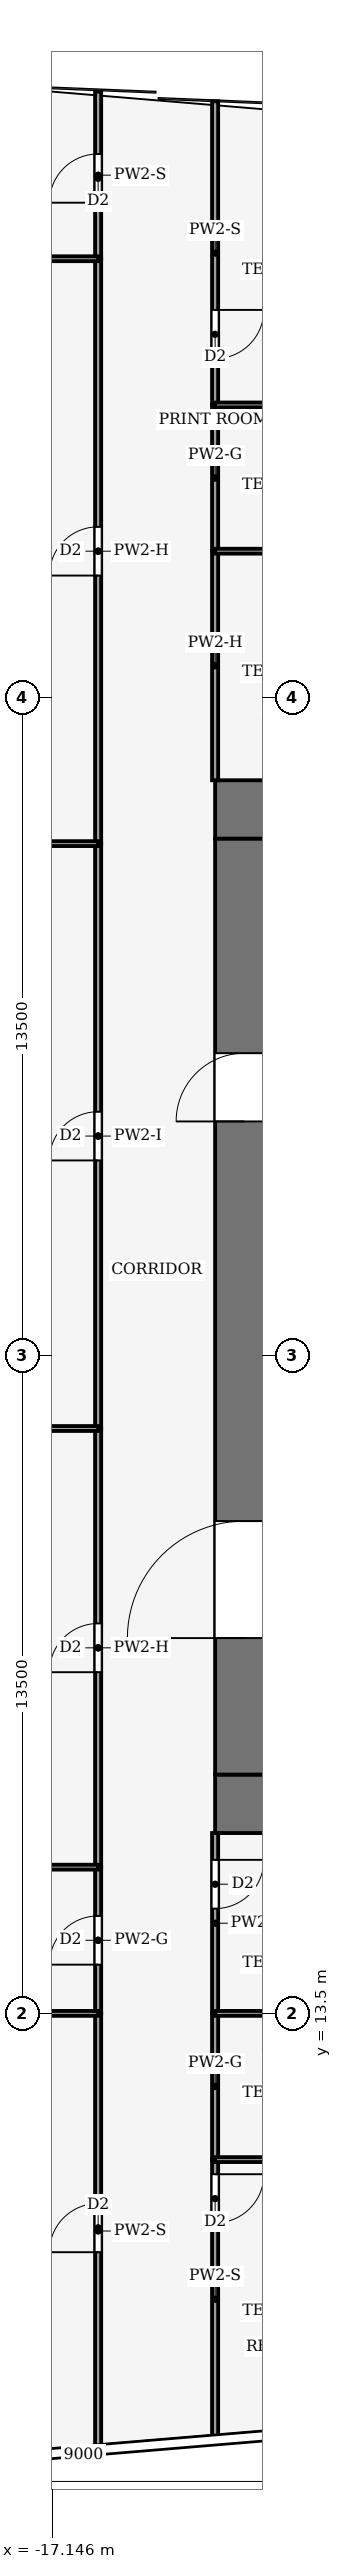
"""IFC4 building model, lengths in metres.
Left out: names, types, materials, properties, quantities, classifications, styles, units other than length and angle.
Written with IfcOpenShell. Run it as: python <this file> out.ifc"""

import sys

from ifc_helpers import new_model, si_unit, direction, frame, frame_2d, origin, place, context, subcontext, project, spatial, rectangle, extrude, element, fill, save


model = new_model("IFC4")
c1 = context("Model", 3, precision=1e-05, world=origin(), true_north=direction((0.0, 1.0)))
c2 = subcontext(c1, "Body", "Model", "MODEL_VIEW")
j1 = project(units=[si_unit("LENGTHUNIT", "METRE"), si_unit("PLANEANGLEUNIT", "RADIAN")], contexts=[c1])
p1 = place(None, origin())
s1 = spatial("IfcSite", under=j1, at=p1, CompositionType="ELEMENT")
p2 = place(p1, origin())
s2 = spatial("IfcBuilding", under=s1, at=p2, CompositionType="ELEMENT")
p3 = place(p2, frame((0.0, 0.0, 90.0)))
s3 = spatial("IfcBuildingStorey", under=s2, at=p3, CompositionType="ELEMENT", Elevation=90.0)
for number, where, z_axis, x_axis in (
    (1, (-13.8, 17.8, -0.13), (0.0, 0.0, 1.0), (1.0, 0.0, 0.0)),
    (2, (-13.8, 38.2, -0.13), (0.0, 0.0, 1.0), (1.0, 0.0, 0.0)),
):
    element("IfcWall", number, at=place(p3, frame(where, z_axis=z_axis, x_axis=x_axis)), inside=s3, PredefinedType="SHEAR", context=c2, shape_type="SweptSolid", body=[
        extrude(rectangle(XDim=27.6, YDim=1.2, at=frame_2d((13.8, 0.0))), origin(), (0.0, 0.0, 1.0), 4.0),
    ])
p4 = place(p3, frame((-13.2, 18.4, -0.13), z_axis=(0.0, 0.0, 1.0), x_axis=(0.0, 1.0, 0.0)))
e3 = element("IfcWall", 3, at=p4, inside=s3, PredefinedType="SHEAR", context=c2, shape_type="SweptSolid", body=[
    extrude(rectangle(XDim=19.2, YDim=1.2, at=frame_2d((9.6, 0.0))), origin(), (0.0, 0.0, 1.0), 4.0),
])
p5 = place(p4, frame((2.8, 0.0, 0.13)))
e4 = element("IfcOpeningElement", 4, at=p5, cuts=e3, PredefinedType="OPENING", context=c2, shape_type="SweptSolid", body=[
    extrude(rectangle(XDim=2.4, YDim=2.4, at=frame_2d((1.2, 1.2))), frame((0.0, 0.61, 0.0), z_axis=(0.0, -1.0, 0.0), x_axis=(1.0, 0.0, 0.0)), (0.0, 0.0, 1.0), 1.22),
])
p6 = place(p4, frame((13.4, 0.0, 0.13)))
e5 = element("IfcOpeningElement", 5, at=p6, cuts=e3, PredefinedType="OPENING", context=c2, shape_type="SweptSolid", body=[
    extrude(rectangle(XDim=1.4, YDim=2.2, at=frame_2d((0.7, 1.1))), frame((0.0, 0.61, 0.0), z_axis=(0.0, -1.0, 0.0), x_axis=(1.0, 0.0, 0.0)), (0.0, 0.0, 1.0), 1.22),
])
p7 = place(p3, frame((-16.2, 4.57, 0.0), z_axis=(0.0, 0.0, 1.0), x_axis=(0.0, 1.0, 0.0)))
e6 = element("IfcWall", 6, at=p7, inside=s3, PredefinedType="PARTITIONING", context=c2, shape_type="SweptSolid", body=[
    extrude(rectangle(XDim=8.93, YDim=0.125, at=frame_2d((4.465, 0.0))), origin(), (0.0, 0.0, 1.0), 3.04),
])
p8 = place(p7, frame((4.03, 0.0, 0.0)))
e7 = element("IfcOpeningElement", 7, at=p8, cuts=e6, PredefinedType="OPENING", context=c2, shape_type="SweptSolid", body=[
    extrude(rectangle(XDim=1.0, YDim=2.1, at=frame_2d((0.5, 1.05))), frame((0.0, 0.073, 0.0), z_axis=(0.0, -1.0, 0.0), x_axis=(1.0, 0.0, 0.0)), (0.0, 0.0, 1.0), 0.145),
])
p9 = place(p3, frame((-16.2, 13.5, 0.0), z_axis=(0.0, 0.0, 1.0), x_axis=(0.0, 1.0, 0.0)))
e8 = element("IfcWall", 8, at=p9, inside=s3, PredefinedType="PARTITIONING", context=c2, shape_type="SweptSolid", body=[
    extrude(rectangle(XDim=3.0, YDim=0.125, at=frame_2d((1.5, 0.0))), origin(), (0.0, 0.0, 1.0), 3.87),
])
p10 = place(p9, frame((1.0, 0.0, 0.0)))
e9 = element("IfcOpeningElement", 9, at=p10, cuts=e8, PredefinedType="OPENING", context=c2, shape_type="SweptSolid", body=[
    extrude(rectangle(XDim=1.0, YDim=2.1, at=frame_2d((0.5, 1.05))), frame((0.0, 0.073, 0.0), z_axis=(0.0, -1.0, 0.0), x_axis=(1.0, 0.0, 0.0)), (0.0, 0.0, 1.0), 0.145),
])
p11 = place(p3, frame((-16.2, 16.5, 0.0), z_axis=(0.0, 0.0, 1.0), x_axis=(0.0, 1.0, 0.0)))
e10 = element("IfcWall", 10, at=p11, inside=s3, PredefinedType="PARTITIONING", context=c2, shape_type="SweptSolid", body=[
    extrude(rectangle(XDim=9.0, YDim=0.125, at=frame_2d((4.5, 0.0))), origin(), (0.0, 0.0, 1.0), 3.14),
])
p12 = place(p11, frame((4.0, 0.0, 0.0)))
e11 = element("IfcOpeningElement", 11, at=p12, cuts=e10, PredefinedType="OPENING", context=c2, shape_type="SweptSolid", body=[
    extrude(rectangle(XDim=1.0, YDim=2.1, at=frame_2d((0.5, 1.05))), frame((0.0, 0.073, 0.0), z_axis=(0.0, -1.0, 0.0), x_axis=(1.0, 0.0, 0.0)), (0.0, 0.0, 1.0), 0.145),
])
p13 = place(p3, frame((-16.2, 25.5, 0.0), z_axis=(0.0, 0.0, 1.0), x_axis=(0.0, 1.0, 0.0)))
e12 = element("IfcWall", 12, at=p13, inside=s3, PredefinedType="PARTITIONING", context=c2, shape_type="SweptSolid", body=[
    extrude(rectangle(XDim=12.0, YDim=0.125, at=frame_2d((6.0, 0.0))), origin(), (0.0, 0.0, 1.0), 3.48),
])
p14 = place(p13, frame((5.5, 0.0, 0.0)))
e13 = element("IfcOpeningElement", 13, at=p14, cuts=e12, PredefinedType="OPENING", context=c2, shape_type="SweptSolid", body=[
    extrude(rectangle(XDim=1.0, YDim=2.1, at=frame_2d((0.5, 1.05))), frame((0.0, 0.073, 0.0), z_axis=(0.0, -1.0, 0.0), x_axis=(1.0, 0.0, 0.0)), (0.0, 0.0, 1.0), 0.145),
])
p15 = place(p3, frame((-16.2, 37.5, 0.0), z_axis=(0.0, 0.0, 1.0), x_axis=(0.0, 1.0, 0.0)))
e14 = element("IfcWall", 14, at=p15, inside=s3, PredefinedType="PARTITIONING", context=c2, shape_type="SweptSolid", body=[
    extrude(rectangle(XDim=12.0, YDim=0.125, at=frame_2d((6.0, 0.0))), origin(), (0.0, 0.0, 1.0), 3.14),
])
p16 = place(p15, frame((5.5, 0.0, 0.0)))
e15 = element("IfcOpeningElement", 15, at=p16, cuts=e14, PredefinedType="OPENING", context=c2, shape_type="SweptSolid", body=[
    extrude(rectangle(XDim=1.0, YDim=2.1, at=frame_2d((0.5, 1.05))), frame((0.0, 0.073, 0.0), z_axis=(0.0, -1.0, 0.0), x_axis=(1.0, 0.0, 0.0)), (0.0, 0.0, 1.0), 0.145),
])
p17 = place(p3, frame((-16.2, 49.5, 0.0), z_axis=(0.0, 0.0, 1.0), x_axis=(0.0, 1.0, 0.0)))
e16 = element("IfcWall", 16, at=p17, inside=s3, PredefinedType="PARTITIONING", context=c2, shape_type="SweptSolid", body=[
    extrude(rectangle(XDim=3.43, YDim=0.125, at=frame_2d((1.715, 0.0))), origin(), (0.0, 0.0, 1.0), 3.04),
])
p18 = place(p17, frame((1.15, 0.0, 0.0)))
e17 = element("IfcOpeningElement", 17, at=p18, cuts=e16, PredefinedType="OPENING", context=c2, shape_type="SweptSolid", body=[
    extrude(rectangle(XDim=1.0, YDim=2.1, at=frame_2d((0.5, 1.05))), frame((0.0, 0.073, 0.0), z_axis=(0.0, -1.0, 0.0), x_axis=(1.0, 0.0, 0.0)), (0.0, 0.0, 1.0), 0.145),
])
p19 = place(p3, frame((-13.8, 10.5, 0.0), z_axis=(0.0, 0.0, 1.0), x_axis=(0.0, -1.0, 0.0)))
e18 = element("IfcWall", 18, at=p19, inside=s3, PredefinedType="PARTITIONING", context=c2, shape_type="SweptSolid", body=[
    extrude(rectangle(XDim=5.73, YDim=0.125, at=frame_2d((2.865, 0.0))), origin(), (0.0, 0.0, 1.0), 3.04),
])
p20 = place(p19, frame((0.3, 0.0, 0.0)))
e19 = element("IfcOpeningElement", 19, at=p20, cuts=e18, PredefinedType="OPENING", context=c2, shape_type="SweptSolid", body=[
    extrude(rectangle(XDim=1.0, YDim=2.1, at=frame_2d((0.5, 1.05))), frame((0.0, 0.073, 0.0), z_axis=(0.0, -1.0, 0.0), x_axis=(1.0, 0.0, 0.0)), (0.0, 0.0, 1.0), 0.145),
])
p21 = place(p3, frame((-13.8, 10.5, 0.0), z_axis=(0.0, 0.0, 1.0), x_axis=(0.0, 1.0, 0.0)))
e20 = element("IfcWall", 20, at=p21, inside=s3, PredefinedType="PARTITIONING", context=c2, shape_type="SweptSolid", body=[
    extrude(rectangle(XDim=3.0, YDim=0.125, at=frame_2d((1.5, 0.0))), origin(), (0.0, 0.0, 1.0), 3.87),
])
p22 = place(p3, frame((-13.8, 17.2, 0.0), z_axis=(0.0, 0.0, 1.0), x_axis=(0.0, -1.0, 0.0)))
e21 = element("IfcWall", 21, at=p22, inside=s3, PredefinedType="PARTITIONING", context=c2, shape_type="SweptSolid", body=[
    extrude(rectangle(XDim=3.7, YDim=0.125, at=frame_2d((1.85, 0.0))), origin(), (0.0, 0.0, 1.0), 3.14),
])
p23 = place(p22, frame((0.55, 0.0, 0.0)))
e22 = element("IfcOpeningElement", 22, at=p23, cuts=e21, PredefinedType="OPENING", context=c2, shape_type="SweptSolid", body=[
    extrude(rectangle(XDim=1.0, YDim=2.1, at=frame_2d((0.5, 1.05))), frame((0.0, 0.073, 0.0), z_axis=(0.0, -1.0, 0.0), x_axis=(1.0, 0.0, 0.0)), (0.0, 0.0, 1.0), 0.145),
])
p24 = place(p3, frame((-13.8, 38.8, 0.0), z_axis=(0.0, 0.0, 1.0), x_axis=(0.0, 1.0, 0.0)))
e23 = element("IfcWall", 23, at=p24, inside=s3, PredefinedType="PARTITIONING", context=c2, shape_type="SweptSolid", body=[
    extrude(rectangle(XDim=4.7, YDim=0.125, at=frame_2d((2.35, 0.0))), origin(), (0.0, 0.0, 1.0), 3.14),
])
p25 = place(p3, frame((-13.8, 43.5, 0.0), z_axis=(0.0, 0.0, 1.0), x_axis=(0.0, 1.0, 0.0)))
e24 = element("IfcWall", 24, at=p25, inside=s3, PredefinedType="PARTITIONING", context=c2, shape_type="SweptSolid", body=[
    extrude(rectangle(XDim=3.0, YDim=0.125, at=frame_2d((1.5, 0.0))), origin(), (0.0, 0.0, 1.0), 3.87),
])
p26 = place(p3, frame((-13.8, 52.73, 0.0), z_axis=(0.0, 0.0, 1.0), x_axis=(0.0, -1.0, 0.0)))
e25 = element("IfcWall", 25, at=p26, inside=s3, PredefinedType="PARTITIONING", context=c2, shape_type="SweptSolid", body=[
    extrude(rectangle(XDim=6.23, YDim=0.125, at=frame_2d((3.115, 0.0))), origin(), (0.0, 0.0, 1.0), 3.04),
])
p27 = place(p26, frame((4.28, 0.0, 0.0)))
e26 = element("IfcOpeningElement", 26, at=p27, cuts=e25, PredefinedType="OPENING", context=c2, shape_type="SweptSolid", body=[
    extrude(rectangle(XDim=1.0, YDim=2.1, at=frame_2d((0.5, 1.05))), frame((0.0, 0.073, 0.0), z_axis=(0.0, -1.0, 0.0), x_axis=(1.0, 0.0, 0.0)), (0.0, 0.0, 1.0), 0.145),
])
p28 = place(p3, frame((-16.2, 13.5, 0.0), z_axis=(0.0, 0.0, 1.0), x_axis=(-1.0, 0.0, 0.0)))
e27 = element("IfcWall", 27, at=p28, inside=s3, PredefinedType="PARTITIONING", context=c2, shape_type="SweptSolid", body=[
    extrude(rectangle(XDim=7.634, YDim=0.1, at=frame_2d((3.817, 0.0))), origin(), (0.0, 0.0, 1.0), 3.04),
])
p29 = place(p3, frame((-16.2, 16.5, 0.0), z_axis=(0.0, 0.0, 1.0), x_axis=(-1.0, 0.0, 0.0)))
e28 = element("IfcWall", 28, at=p29, inside=s3, PredefinedType="PARTITIONING", context=c2, shape_type="SweptSolid", body=[
    extrude(rectangle(XDim=7.387, YDim=0.1, at=frame_2d((3.693, 0.0))), origin(), (0.0, 0.0, 1.0), 3.04),
])
p30 = place(p3, frame((-16.2, 25.5, 0.0), z_axis=(0.0, 0.0, 1.0), x_axis=(-1.0, 0.0, 0.0)))
e29 = element("IfcWall", 29, at=p30, inside=s3, PredefinedType="PARTITIONING", context=c2, shape_type="SweptSolid", body=[
    extrude(rectangle(XDim=6.647, YDim=0.1, at=frame_2d((3.324, 0.0))), origin(), (0.0, 0.0, 1.0), 3.04),
])
p31 = place(p3, frame((-16.2, 37.5, 0.0), z_axis=(0.0, 0.0, 1.0), x_axis=(-1.0, 0.0, 0.0)))
e30 = element("IfcWall", 30, at=p31, inside=s3, PredefinedType="PARTITIONING", context=c2, shape_type="SweptSolid", body=[
    extrude(rectangle(XDim=7.099, YDim=0.1, at=frame_2d((3.55, 0.0))), origin(), (0.0, 0.0, 1.0), 3.04),
])
p32 = place(p3, frame((-16.2, 49.5, 0.0), z_axis=(0.0, 0.0, 1.0), x_axis=(-1.0, 0.0, 0.0)))
e31 = element("IfcWall", 31, at=p32, inside=s3, PredefinedType="PARTITIONING", context=c2, shape_type="SweptSolid", body=[
    extrude(rectangle(XDim=7.287, YDim=0.1, at=frame_2d((3.644, 0.0))), origin(), (0.0, 0.0, 1.0), 3.34),
])
p33 = place(p3, frame((-13.8, 10.5, 0.0), z_axis=(0.0, 0.0, 1.0), x_axis=(1.0, 0.0, 0.0)))
e32 = element("IfcWall", 32, at=p33, inside=s3, PredefinedType="PARTITIONING", context=c2, shape_type="SweptSolid", body=[
    extrude(rectangle(XDim=3.3, YDim=0.1, at=frame_2d((1.65, 0.0))), origin(), (0.0, 0.0, 1.0), 3.44),
])
p34 = place(p33, frame((1.95, 0.0, 0.0)))
e33 = element("IfcOpeningElement", 33, at=p34, cuts=e32, PredefinedType="OPENING", context=c2, shape_type="SweptSolid", body=[
    extrude(rectangle(XDim=1.0, YDim=2.1, at=frame_2d((0.5, 1.05))), frame((0.0, 0.06, 0.0), z_axis=(0.0, -1.0, 0.0), x_axis=(1.0, 0.0, 0.0)), (0.0, 0.0, 1.0), 0.12),
])
p35 = place(p3, frame((-10.5, 13.5, 0.0), z_axis=(0.0, 0.0, 1.0), x_axis=(-1.0, 0.0, 0.0)))
e34 = element("IfcWall", 34, at=p35, inside=s3, PredefinedType="PARTITIONING", context=c2, shape_type="SweptSolid", body=[
    extrude(rectangle(XDim=3.3, YDim=0.1, at=frame_2d((1.65, 0.0))), origin(), (0.0, 0.0, 1.0), 3.44),
])
p36 = place(p3, frame((-10.5, 43.5, 0.0), z_axis=(0.0, 0.0, 1.0), x_axis=(-1.0, 0.0, 0.0)))
e35 = element("IfcWall", 35, at=p36, inside=s3, PredefinedType="PARTITIONING", context=c2, shape_type="SweptSolid", body=[
    extrude(rectangle(XDim=3.3, YDim=0.1, at=frame_2d((1.65, 0.0))), origin(), (0.0, 0.0, 1.0), 3.39),
])
p37 = place(p36, frame((1.15, 0.0, 0.0)))
e36 = element("IfcOpeningElement", 36, at=p37, cuts=e35, PredefinedType="OPENING", context=c2, shape_type="SweptSolid", body=[
    extrude(rectangle(XDim=1.0, YDim=2.1, at=frame_2d((0.5, 1.05))), frame((0.0, 0.06, 0.0), z_axis=(0.0, -1.0, 0.0), x_axis=(1.0, 0.0, 0.0)), (0.0, 0.0, 1.0), 0.12),
])
p38 = place(p3, frame((-10.5, 46.5, 0.0), z_axis=(0.0, 0.0, 1.0), x_axis=(-1.0, 0.0, 0.0)))
e37 = element("IfcWall", 37, at=p38, inside=s3, PredefinedType="PARTITIONING", context=c2, shape_type="SweptSolid", body=[
    extrude(rectangle(XDim=3.3, YDim=0.1, at=frame_2d((1.65, 0.0))), origin(), (0.0, 0.0, 1.0), 3.39),
])
p39 = place(p38, frame((0.35, 0.0, 0.0)))
e38 = element("IfcOpeningElement", 38, at=p39, cuts=e37, PredefinedType="OPENING", context=c2, shape_type="SweptSolid", body=[
    extrude(rectangle(XDim=1.0, YDim=2.1, at=frame_2d((0.5, 1.05))), frame((0.0, 0.06, 0.0), z_axis=(0.0, -1.0, 0.0), x_axis=(1.0, 0.0, 0.0)), (0.0, 0.0, 1.0), 0.12),
])
p40 = place(p5, origin())
e39 = element("IfcDoor", 39, at=p40, inside=s3, OperationType="DOUBLE_DOOR_SINGLE_SWING", PredefinedType="DOOR", context=c2, shape_type="SweptSolid", body=[
    extrude(rectangle(XDim=2.4, YDim=2.4, at=frame_2d((1.2, 1.2))), frame((0.0, 0.025, 0.0), z_axis=(0.0, -1.0, 0.0), x_axis=(1.0, 0.0, 0.0)), (0.0, 0.0, 1.0), 0.05),
])
fill(e4, e39)
p41 = place(p6, origin())
e40 = element("IfcDoor", 40, at=p41, inside=s3, OperationType="SINGLE_SWING_RIGHT", PredefinedType="DOOR", context=c2, shape_type="SweptSolid", body=[
    extrude(rectangle(XDim=1.4, YDim=2.2, at=frame_2d((0.7, 1.1))), frame((0.0, 0.025, 0.0), z_axis=(0.0, -1.0, 0.0), x_axis=(1.0, 0.0, 0.0)), (0.0, 0.0, 1.0), 0.05),
])
fill(e5, e40)
p42 = place(p8, origin())
e41 = element("IfcDoor", 41, at=p42, inside=s3, OperationType="SINGLE_SWING_RIGHT", PredefinedType="DOOR", context=c2, shape_type="SweptSolid", body=[
    extrude(rectangle(XDim=1.0, YDim=2.1, at=frame_2d((0.5, 1.05))), frame((0.0, 0.025, 0.0), z_axis=(0.0, -1.0, 0.0), x_axis=(1.0, 0.0, 0.0)), (0.0, 0.0, 1.0), 0.05),
])
fill(e7, e41)
p43 = place(p10, origin())
e42 = element("IfcDoor", 42, at=p43, inside=s3, OperationType="SINGLE_SWING_RIGHT", PredefinedType="DOOR", context=c2, shape_type="SweptSolid", body=[
    extrude(rectangle(XDim=1.0, YDim=2.1, at=frame_2d((0.5, 1.05))), frame((0.0, 0.025, 0.0), z_axis=(0.0, -1.0, 0.0), x_axis=(1.0, 0.0, 0.0)), (0.0, 0.0, 1.0), 0.05),
])
fill(e9, e42)
p44 = place(p12, origin())
e43 = element("IfcDoor", 43, at=p44, inside=s3, OperationType="SINGLE_SWING_LEFT", PredefinedType="DOOR", context=c2, shape_type="SweptSolid", body=[
    extrude(rectangle(XDim=1.0, YDim=2.1, at=frame_2d((0.5, 1.05))), frame((0.0, 0.025, 0.0), z_axis=(0.0, -1.0, 0.0), x_axis=(1.0, 0.0, 0.0)), (0.0, 0.0, 1.0), 0.05),
])
fill(e11, e43)
p45 = place(p14, origin())
e44 = element("IfcDoor", 44, at=p45, inside=s3, OperationType="SINGLE_SWING_RIGHT", PredefinedType="DOOR", context=c2, shape_type="SweptSolid", body=[
    extrude(rectangle(XDim=1.0, YDim=2.1, at=frame_2d((0.5, 1.05))), frame((0.0, 0.025, 0.0), z_axis=(0.0, -1.0, 0.0), x_axis=(1.0, 0.0, 0.0)), (0.0, 0.0, 1.0), 0.05),
])
fill(e13, e44)
p46 = place(p16, origin())
e45 = element("IfcDoor", 45, at=p46, inside=s3, OperationType="SINGLE_SWING_LEFT", PredefinedType="DOOR", context=c2, shape_type="SweptSolid", body=[
    extrude(rectangle(XDim=1.0, YDim=2.1, at=frame_2d((0.5, 1.05))), frame((0.0, 0.025, 0.0), z_axis=(0.0, -1.0, 0.0), x_axis=(1.0, 0.0, 0.0)), (0.0, 0.0, 1.0), 0.05),
])
fill(e15, e45)
p47 = place(p18, origin())
e46 = element("IfcDoor", 46, at=p47, inside=s3, OperationType="SINGLE_SWING_LEFT", PredefinedType="DOOR", context=c2, shape_type="SweptSolid", body=[
    extrude(rectangle(XDim=1.0, YDim=2.1, at=frame_2d((0.5, 1.05))), frame((0.0, 0.025, 0.0), z_axis=(0.0, -1.0, 0.0), x_axis=(1.0, 0.0, 0.0)), (0.0, 0.0, 1.0), 0.05),
])
fill(e17, e46)
p48 = place(p20, origin())
e47 = element("IfcDoor", 47, at=p48, inside=s3, OperationType="SINGLE_SWING_LEFT", PredefinedType="DOOR", context=c2, shape_type="SweptSolid", body=[
    extrude(rectangle(XDim=1.0, YDim=2.1, at=frame_2d((0.5, 1.05))), frame((0.0, 0.025, 0.0), z_axis=(0.0, -1.0, 0.0), x_axis=(1.0, 0.0, 0.0)), (0.0, 0.0, 1.0), 0.05),
])
fill(e19, e47)
p49 = place(p23, origin())
e48 = element("IfcDoor", 48, at=p49, inside=s3, OperationType="SINGLE_SWING_LEFT", PredefinedType="DOOR", context=c2, shape_type="SweptSolid", body=[
    extrude(rectangle(XDim=1.0, YDim=2.1, at=frame_2d((0.5, 1.05))), frame((0.0, 0.025, 0.0), z_axis=(0.0, -1.0, 0.0), x_axis=(1.0, 0.0, 0.0)), (0.0, 0.0, 1.0), 0.05),
])
fill(e22, e48)
p50 = place(p27, origin())
e49 = element("IfcDoor", 49, at=p50, inside=s3, OperationType="SINGLE_SWING_RIGHT", PredefinedType="DOOR", context=c2, shape_type="SweptSolid", body=[
    extrude(rectangle(XDim=1.0, YDim=2.1, at=frame_2d((0.5, 1.05))), frame((0.0, 0.025, 0.0), z_axis=(0.0, -1.0, 0.0), x_axis=(1.0, 0.0, 0.0)), (0.0, 0.0, 1.0), 0.05),
])
fill(e26, e49)
save(model, sys.argv[1])
